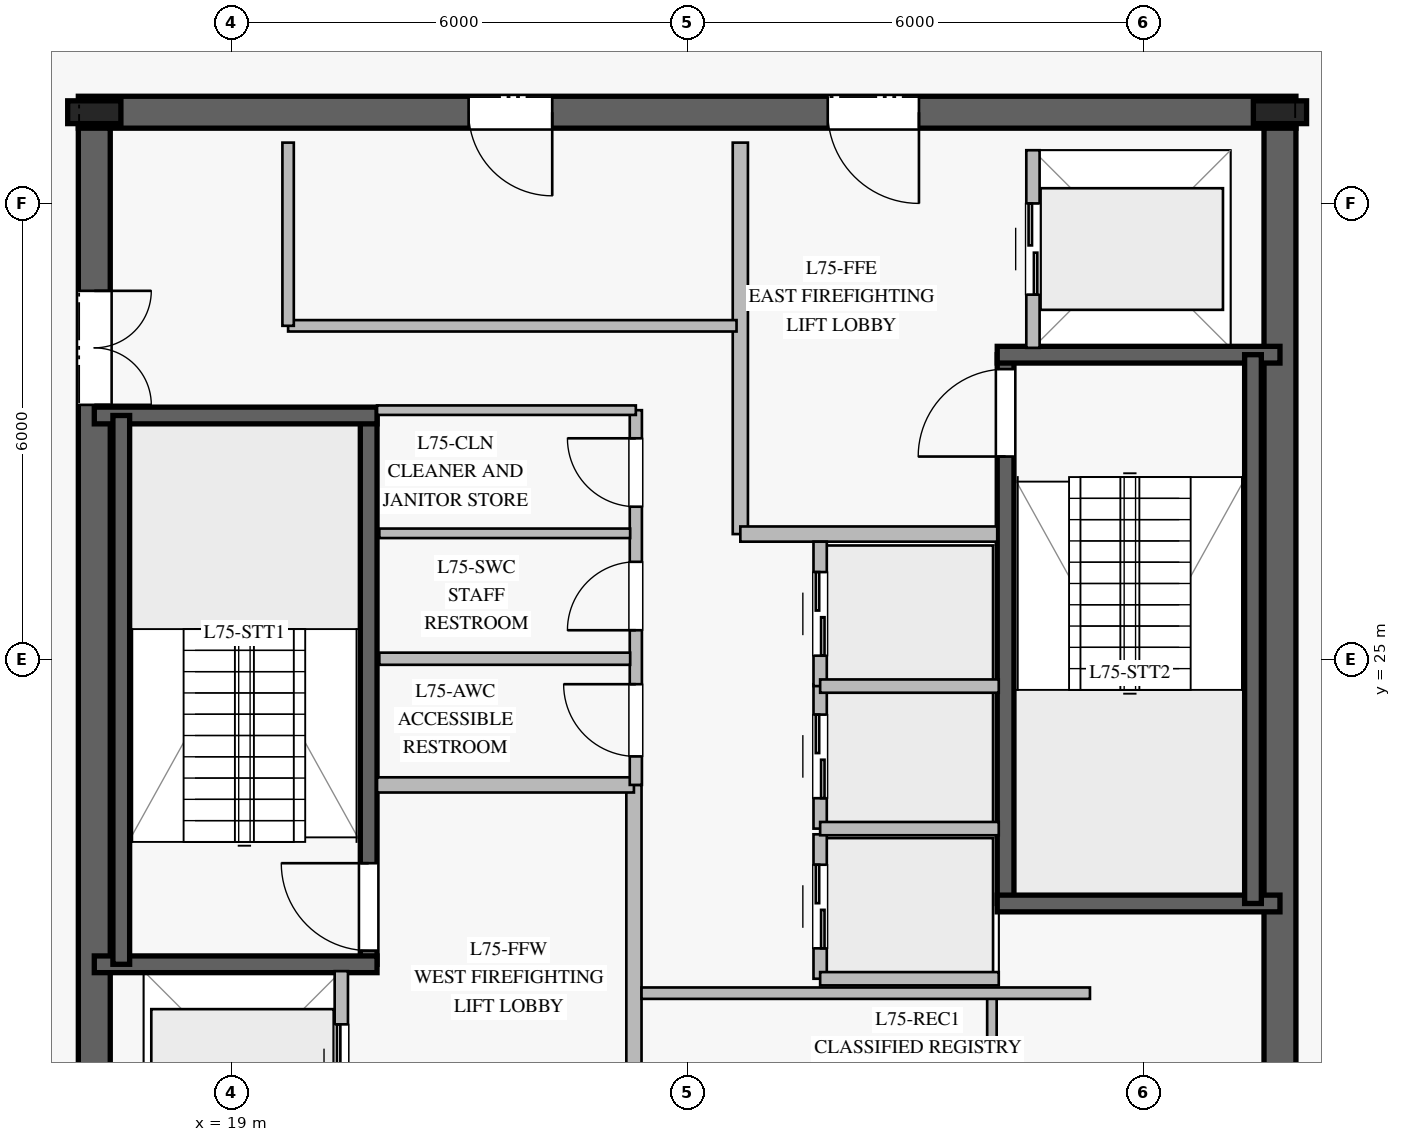
"""IFC4 building model, lengths in metres.
Left out: names, types, materials, properties, quantities, classifications, styles, units other than length and angle.
Written with IfcOpenShell. Run it as: python <this file> out.ifc"""

import sys

from ifc_helpers import new_model, si_unit, direction, frame, frame_2d, origin, origin_2d, place, context, subcontext, project, spatial, rectangle, i_section, extrude, element, fill, save


model = new_model("IFC4")
c1 = context("Model", 3, precision=1e-05, world=origin(), true_north=direction((0.0, 1.0)))
c2 = subcontext(c1, "Body", "Model", "MODEL_VIEW")
j1 = project(units=[si_unit("LENGTHUNIT", "METRE"), si_unit("PLANEANGLEUNIT", "RADIAN")], contexts=[c1])
p1 = place(None, origin())
s1 = spatial("IfcSite", under=j1, at=p1, CompositionType="ELEMENT")
p2 = place(p1, origin())
s2 = spatial("IfcBuilding", under=s1, at=p2, CompositionType="ELEMENT")
p3 = place(p2, frame((0.0, 0.0, 310.2)))
s3 = spatial("IfcBuildingStorey", under=s2, at=p3, CompositionType="ELEMENT", Elevation=310.2)
p4 = place(p3, frame((33.01, 32.2, 0.0), z_axis=(0.0, 0.0, 1.0), x_axis=(-1.0, 0.0, 0.0)))
e1 = element("IfcWall", 1, at=p4, inside=s3, PredefinedType="SHEAR", context=c2, shape_type="SweptSolid", body=[
    extrude(rectangle(XDim=16.02, YDim=0.42, at=frame_2d((8.01, 0.0))), origin(), (0.0, 0.0, 1.0), 3.78),
])
p5 = place(p4, frame((4.96, 0.0, 0.0)))
e2 = element("IfcOpeningElement", 2, at=p5, cuts=e1, PredefinedType="OPENING", context=c2, shape_type="SweptSolid", body=[
    extrude(rectangle(XDim=1.2, YDim=2.25, at=frame_2d((0.6, 1.125))), frame((0.0, 0.22, 0.0), z_axis=(0.0, -1.0, 0.0), x_axis=(1.0, 0.0, 0.0)), (0.0, 0.0, 1.0), 0.44),
])
p6 = place(p4, frame((9.785, 0.0, 0.0)))
e3 = element("IfcOpeningElement", 3, at=p6, cuts=e1, PredefinedType="OPENING", context=c2, shape_type="SweptSolid", body=[
    extrude(rectangle(XDim=1.1, YDim=2.2, at=frame_2d((0.55, 1.1))), frame((0.0, 0.22, 0.0), z_axis=(0.0, -1.0, 0.0), x_axis=(1.0, 0.0, 0.0)), (0.0, 0.0, 1.0), 0.44),
])
p7 = place(p3, frame((17.2, 31.99, 0.0), z_axis=(0.0, 0.0, 1.0), x_axis=(0.0, -1.0, 0.0)))
e4 = element("IfcWall", 4, at=p7, inside=s3, PredefinedType="SHEAR", context=c2, shape_type="SweptSolid", body=[
    extrude(rectangle(XDim=13.98, YDim=0.42, at=frame_2d((6.99, 0.0))), origin(), (0.0, 0.0, 1.0), 3.78),
])
p8 = place(p7, frame((2.14, 0.0, 0.0)))
e5 = element("IfcOpeningElement", 5, at=p8, cuts=e4, PredefinedType="OPENING", context=c2, shape_type="SweptSolid", body=[
    extrude(rectangle(XDim=1.5, YDim=2.2, at=frame_2d((0.75, 1.1))), frame((0.0, 0.22, 0.0), z_axis=(0.0, -1.0, 0.0), x_axis=(1.0, 0.0, 0.0)), (0.0, 0.0, 1.0), 0.44),
])
p9 = place(p3, frame((32.8, 18.01, 0.0), z_axis=(0.0, 0.0, 1.0), x_axis=(0.0, 1.0, 0.0)))
e6 = element("IfcWall", 6, at=p9, inside=s3, PredefinedType="SHEAR", context=c2, shape_type="SweptSolid", body=[
    extrude(rectangle(XDim=13.98, YDim=0.42, at=frame_2d((6.99, 0.0))), origin(), (0.0, 0.0, 1.0), 3.78),
])
for number, where, z_axis, x_axis in (
    (7, (32.8, 32.2, 0.0), (0.0, 0.0, 1.0), (1.0, 0.0, 0.0)),
    (8, (17.2, 32.2, 0.0), (0.0, 0.0, 1.0), (1.0, 0.0, 0.0)),
):
    element("IfcColumn", number, at=place(p3, frame(where, z_axis=z_axis, x_axis=x_axis)), inside=s3, PredefinedType="COLUMN", context=c2, shape_type="SweptSolid", body=[
        extrude(i_section(OverallWidth=0.3, OverallDepth=0.7, WebThickness=0.017, FlangeThickness=0.032, at=origin_2d()), origin(), (0.0, 0.0, 1.0), 4.0),
    ])
p10 = place(p3, frame((20.81, 20.99, 0.0), z_axis=(0.0, 0.0, 1.0), x_axis=(0.0, 1.0, 0.0)))
e9 = element("IfcWall", 9, at=p10, inside=s3, PredefinedType="SOLIDWALL", context=c2, shape_type="SweptSolid", body=[
    extrude(rectangle(XDim=7.22, YDim=0.22, at=frame_2d((3.61, 0.0))), origin(), (0.0, 0.0, 1.0), 3.78),
])
p11 = place(p10, frame((0.18, 0.0, 0.0)))
e10 = element("IfcOpeningElement", 10, at=p11, cuts=e9, PredefinedType="OPENING", context=c2, shape_type="SweptSolid", body=[
    extrude(rectangle(XDim=1.15, YDim=2.2, at=frame_2d((0.575, 1.1))), frame((0.0, 0.12, 0.0), z_axis=(0.0, -1.0, 0.0), x_axis=(1.0, 0.0, 0.0)), (0.0, 0.0, 1.0), 0.24),
])
for number, where, z_axis, x_axis in (
    (11, (17.2, 20.99, 0.0), (0.0, 0.0, 1.0), (1.0, 0.0, 0.0)),
    (12, (17.2, 28.21, 0.0), (0.0, 0.0, 1.0), (1.0, 0.0, 0.0)),
):
    element("IfcWall", number, at=place(p3, frame(where, z_axis=z_axis, x_axis=x_axis)), inside=s3, PredefinedType="SOLIDWALL", context=c2, shape_type="SweptSolid", body=[
        extrude(rectangle(XDim=3.72, YDim=0.22, at=frame_2d((1.86, 0.0))), origin(), (0.0, 0.0, 1.0), 3.78),
    ])
p12 = place(p3, frame((17.555, 28.21, 0.0), z_axis=(0.0, 0.0, 1.0), x_axis=(0.0, -1.0, 0.0)))
e13 = element("IfcWall", 13, at=p12, inside=s3, PredefinedType="SOLIDWALL", context=c2, shape_type="SweptSolid", body=[
    extrude(rectangle(XDim=7.22, YDim=0.22, at=frame_2d((3.61, 0.0))), origin(), (0.0, 0.0, 1.0), 3.78),
])
p13 = place(p3, frame((29.19, 21.79, 0.0), z_axis=(0.0, 0.0, 1.0), x_axis=(0.0, 1.0, 0.0)))
e14 = element("IfcWall", 14, at=p13, inside=s3, PredefinedType="SOLIDWALL", context=c2, shape_type="SweptSolid", body=[
    extrude(rectangle(XDim=7.22, YDim=0.22, at=frame_2d((3.61, 0.0))), origin(), (0.0, 0.0, 1.0), 3.78),
])
p14 = place(p13, frame((5.88, 0.0, 0.0)))
e15 = element("IfcOpeningElement", 15, at=p14, cuts=e14, PredefinedType="OPENING", context=c2, shape_type="SweptSolid", body=[
    extrude(rectangle(XDim=1.15, YDim=2.2, at=frame_2d((0.575, 1.1))), frame((0.0, 0.12, 0.0), z_axis=(0.0, -1.0, 0.0), x_axis=(1.0, 0.0, 0.0)), (0.0, 0.0, 1.0), 0.24),
])
for number, where, z_axis, x_axis in (
    (16, (29.08, 21.79, 0.0), (0.0, 0.0, 1.0), (1.0, 0.0, 0.0)),
    (17, (29.08, 29.01, 0.0), (0.0, 0.0, 1.0), (1.0, 0.0, 0.0)),
):
    element("IfcWall", number, at=place(p3, frame(where, z_axis=z_axis, x_axis=x_axis)), inside=s3, PredefinedType="SOLIDWALL", context=c2, shape_type="SweptSolid", body=[
        extrude(rectangle(XDim=3.72, YDim=0.22, at=frame_2d((1.86, 0.0))), origin(), (0.0, 0.0, 1.0), 3.78),
    ])
p15 = place(p3, frame((32.445, 29.01, 0.0), z_axis=(0.0, 0.0, 1.0), x_axis=(0.0, -1.0, 0.0)))
e18 = element("IfcWall", 18, at=p15, inside=s3, PredefinedType="SOLIDWALL", context=c2, shape_type="SweptSolid", body=[
    extrude(rectangle(XDim=7.22, YDim=0.22, at=frame_2d((3.61, 0.0))), origin(), (0.0, 0.0, 1.0), 3.78),
])
p16 = place(p3, frame((24.3, 18.2, 0.0), z_axis=(0.0, 0.0, 1.0), x_axis=(0.0, 1.0, 0.0)))
e19 = element("IfcWall", 19, at=p16, inside=s3, PredefinedType="PARTITIONING", context=c2, shape_type="SweptSolid", body=[
    extrude(rectangle(XDim=5.15, YDim=0.2, at=frame_2d((2.575, 0.0))), origin(), (0.0, 0.0, 1.0), 3.78),
])
p17 = place(p3, frame((20.92, 23.35, 0.0), z_axis=(0.0, 0.0, 1.0), x_axis=(1.0, 0.0, 0.0)))
e20 = element("IfcWall", 20, at=p17, inside=s3, PredefinedType="PARTITIONING", context=c2, shape_type="SweptSolid", body=[
    extrude(rectangle(XDim=3.38, YDim=0.2, at=frame_2d((1.69, 0.0))), origin(), (0.0, 0.0, 1.0), 3.78),
])
p18 = place(p3, frame((25.7, 26.65, 0.0), z_axis=(0.0, 0.0, 1.0), x_axis=(0.0, 1.0, 0.0)))
e21 = element("IfcWall", 21, at=p18, inside=s3, PredefinedType="PARTITIONING", context=c2, shape_type="SweptSolid", body=[
    extrude(rectangle(XDim=5.15, YDim=0.2, at=frame_2d((2.575, 0.0))), origin(), (0.0, 0.0, 1.0), 3.78),
])
p19 = place(p3, frame((25.7, 26.65, 0.0), z_axis=(0.0, 0.0, 1.0), x_axis=(1.0, 0.0, 0.0)))
e22 = element("IfcWall", 22, at=p19, inside=s3, PredefinedType="PARTITIONING", context=c2, shape_type="SweptSolid", body=[
    extrude(rectangle(XDim=3.38, YDim=0.2, at=frame_2d((1.69, 0.0))), origin(), (0.0, 0.0, 1.0), 3.78),
])
p20 = place(p3, frame((24.325, 23.35, 0.0), z_axis=(0.0, 0.0, 1.0), x_axis=(0.0, 1.0, 0.0)))
e23 = element("IfcWall", 23, at=p20, inside=s3, PredefinedType="PLUMBINGWALL", context=c2, shape_type="SweptSolid", body=[
    extrude(rectangle(XDim=4.93, YDim=0.16, at=frame_2d((2.465, 0.0))), origin(), (0.0, 0.0, 1.0), 3.78),
])
p21 = place(p20, frame((0.375, 0.0, 0.0)))
e24 = element("IfcOpeningElement", 24, at=p21, cuts=e23, PredefinedType="OPENING", context=c2, shape_type="SweptSolid", body=[
    extrude(rectangle(XDim=0.95, YDim=2.1, at=frame_2d((0.475, 1.05))), frame((0.0, 0.09, 0.0), z_axis=(0.0, -1.0, 0.0), x_axis=(1.0, 0.0, 0.0)), (0.0, 0.0, 1.0), 0.18),
])
p22 = place(p20, frame((2.035, 0.0, 0.0)))
e25 = element("IfcOpeningElement", 25, at=p22, cuts=e23, PredefinedType="OPENING", context=c2, shape_type="SweptSolid", body=[
    extrude(rectangle(XDim=0.9, YDim=2.1, at=frame_2d((0.45, 1.05))), frame((0.0, 0.09, 0.0), z_axis=(0.0, -1.0, 0.0), x_axis=(1.0, 0.0, 0.0)), (0.0, 0.0, 1.0), 0.18),
])
p23 = place(p20, frame((3.66, 0.0, 0.0)))
e26 = element("IfcOpeningElement", 26, at=p23, cuts=e23, PredefinedType="OPENING", context=c2, shape_type="SweptSolid", body=[
    extrude(rectangle(XDim=0.9, YDim=2.1, at=frame_2d((0.45, 1.05))), frame((0.0, 0.09, 0.0), z_axis=(0.0, -1.0, 0.0), x_axis=(1.0, 0.0, 0.0)), (0.0, 0.0, 1.0), 0.18),
])
p24 = place(p3, frame((20.92, 28.28, 0.0), z_axis=(0.0, 0.0, 1.0), x_axis=(1.0, 0.0, 0.0)))
e27 = element("IfcWall", 27, at=p24, inside=s3, PredefinedType="PARTITIONING", context=c2, shape_type="SweptSolid", body=[
    extrude(rectangle(XDim=3.405, YDim=0.125, at=frame_2d((1.703, 0.0))), origin(), (0.0, 0.0, 1.0), 3.78),
])
p25 = place(p3, frame((29.01, 18.01, 0.0), z_axis=(0.0, 0.0, 1.0), x_axis=(0.0, 1.0, 0.0)))
e28 = element("IfcWall", 28, at=p25, inside=s3, PredefinedType="PARTITIONING", context=c2, shape_type="SweptSolid", body=[
    extrude(rectangle(XDim=2.54, YDim=0.125, at=frame_2d((1.27, 0.0))), origin(), (0.0, 0.0, 1.0), 3.78),
])
p26 = place(p3, frame((20.95, 25.01, 0.0), z_axis=(0.0, 0.0, 1.0), x_axis=(1.0, 0.0, 0.0)))
e29 = element("IfcWall", 29, at=p26, inside=s3, PredefinedType="PLUMBINGWALL", context=c2, shape_type="SweptSolid", body=[
    extrude(rectangle(XDim=3.3, YDim=0.16, at=frame_2d((1.65, 0.0))), origin(), (0.0, 0.0, 1.0), 3.78),
])
p27 = place(p3, frame((20.95, 26.66, 0.0), z_axis=(0.0, 0.0, 1.0), x_axis=(1.0, 0.0, 0.0)))
e30 = element("IfcWall", 30, at=p27, inside=s3, PredefinedType="PARTITIONING", context=c2, shape_type="SweptSolid", body=[
    extrude(rectangle(XDim=3.3, YDim=0.125, at=frame_2d((1.65, 0.0))), origin(), (0.0, 0.0, 1.0), 3.78),
])
p28 = place(p3, frame((24.4, 20.61, 0.0), z_axis=(0.0, 0.0, 1.0), x_axis=(1.0, 0.0, 0.0)))
e31 = element("IfcWall", 31, at=p28, inside=s3, PredefinedType="PARTITIONING", context=c2, shape_type="SweptSolid", body=[
    extrude(rectangle(XDim=5.9, YDim=0.15, at=frame_2d((2.95, 0.0))), origin(), (0.0, 0.0, 1.0), 3.78),
])
p29 = place(p3, frame((19.75, 29.39, 0.0), z_axis=(0.0, 0.0, 1.0), x_axis=(1.0, 0.0, 0.0)))
e32 = element("IfcWall", 32, at=p29, inside=s3, PredefinedType="PARTITIONING", context=c2, shape_type="SweptSolid", body=[
    extrude(rectangle(XDim=5.9, YDim=0.15, at=frame_2d((2.95, 0.0))), origin(), (0.0, 0.0, 1.0), 3.78),
])
p30 = place(p3, frame((19.75, 29.39, 0.0), z_axis=(0.0, 0.0, 1.0), x_axis=(0.0, 1.0, 0.0)))
e33 = element("IfcWall", 33, at=p30, inside=s3, PredefinedType="PARTITIONING", context=c2, shape_type="SweptSolid", body=[
    extrude(rectangle(XDim=2.41, YDim=0.15, at=frame_2d((1.205, 0.0))), origin(), (0.0, 0.0, 1.0), 3.78),
])
p31 = place(p3, frame((26.75, 20.8, 0.0), z_axis=(0.0, 0.0, 1.0), x_axis=(0.0, 1.0, 0.0)))
e34 = element("IfcWall", 34, at=p31, inside=s3, PredefinedType="PARTITIONING", context=c2, shape_type="SweptSolid", body=[
    extrude(rectangle(XDim=1.9, YDim=0.175, at=frame_2d((0.95, 0.0))), origin(), (0.0, 0.0, 1.0), 3.78),
])
p32 = place(p31, frame((0.4, 0.0, 0.0)))
e35 = element("IfcOpeningElement", 35, at=p32, cuts=e34, PredefinedType="OPENING", context=c2, shape_type="SweptSolid", body=[
    extrude(rectangle(XDim=1.1, YDim=2.2, at=frame_2d((0.55, 1.1))), frame((0.0, 0.098, 0.0), z_axis=(0.0, -1.0, 0.0), x_axis=(1.0, 0.0, 0.0)), (0.0, 0.0, 1.0), 0.195),
])
p33 = place(p3, frame((26.75, 20.8, 0.0), z_axis=(0.0, 0.0, 1.0), x_axis=(1.0, 0.0, 0.0)))
e36 = element("IfcWall", 36, at=p33, inside=s3, PredefinedType="PARTITIONING", context=c2, shape_type="SweptSolid", body=[
    extrude(rectangle(XDim=2.35, YDim=0.175, at=frame_2d((1.175, 0.0))), origin(), (0.0, 0.0, 1.0), 3.78),
])
p34 = place(p3, frame((26.75, 22.775, 0.0), z_axis=(0.0, 0.0, 1.0), x_axis=(0.0, 1.0, 0.0)))
e37 = element("IfcWall", 37, at=p34, inside=s3, PredefinedType="PARTITIONING", context=c2, shape_type="SweptSolid", body=[
    extrude(rectangle(XDim=1.9, YDim=0.175, at=frame_2d((0.95, 0.0))), origin(), (0.0, 0.0, 1.0), 3.78),
])
p35 = place(p34, frame((0.4, 0.0, 0.0)))
e38 = element("IfcOpeningElement", 38, at=p35, cuts=e37, PredefinedType="OPENING", context=c2, shape_type="SweptSolid", body=[
    extrude(rectangle(XDim=1.1, YDim=2.2, at=frame_2d((0.55, 1.1))), frame((0.0, 0.098, 0.0), z_axis=(0.0, -1.0, 0.0), x_axis=(1.0, 0.0, 0.0)), (0.0, 0.0, 1.0), 0.195),
])
p36 = place(p3, frame((26.75, 22.775, 0.0), z_axis=(0.0, 0.0, 1.0), x_axis=(1.0, 0.0, 0.0)))
e39 = element("IfcWall", 39, at=p36, inside=s3, PredefinedType="PARTITIONING", context=c2, shape_type="SweptSolid", body=[
    extrude(rectangle(XDim=2.35, YDim=0.175, at=frame_2d((1.175, 0.0))), origin(), (0.0, 0.0, 1.0), 3.78),
])
p37 = place(p3, frame((26.75, 24.65, 0.0), z_axis=(0.0, 0.0, 1.0), x_axis=(0.0, 1.0, 0.0)))
e40 = element("IfcWall", 40, at=p37, inside=s3, PredefinedType="PARTITIONING", context=c2, shape_type="SweptSolid", body=[
    extrude(rectangle(XDim=1.9, YDim=0.175, at=frame_2d((0.95, 0.0))), origin(), (0.0, 0.0, 1.0), 3.78),
])
p38 = place(p37, frame((0.4, 0.0, 0.0)))
e41 = element("IfcOpeningElement", 41, at=p38, cuts=e40, PredefinedType="OPENING", context=c2, shape_type="SweptSolid", body=[
    extrude(rectangle(XDim=1.1, YDim=2.2, at=frame_2d((0.55, 1.1))), frame((0.0, 0.098, 0.0), z_axis=(0.0, -1.0, 0.0), x_axis=(1.0, 0.0, 0.0)), (0.0, 0.0, 1.0), 0.195),
])
p39 = place(p3, frame((26.75, 24.65, 0.0), z_axis=(0.0, 0.0, 1.0), x_axis=(1.0, 0.0, 0.0)))
e42 = element("IfcWall", 42, at=p39, inside=s3, PredefinedType="PARTITIONING", context=c2, shape_type="SweptSolid", body=[
    extrude(rectangle(XDim=2.35, YDim=0.175, at=frame_2d((1.175, 0.0))), origin(), (0.0, 0.0, 1.0), 3.78),
])
p40 = place(p3, frame((20.45, 18.3, 0.0), z_axis=(0.0, 0.0, 1.0), x_axis=(0.0, 1.0, 0.0)))
e43 = element("IfcWall", 43, at=p40, inside=s3, PredefinedType="PARTITIONING", context=c2, shape_type="SweptSolid", body=[
    extrude(rectangle(XDim=2.6, YDim=0.175, at=frame_2d((1.3, 0.0))), origin(), (0.0, 0.0, 1.0), 3.78),
])
p41 = place(p40, frame((0.7, 0.0, 0.0)))
e44 = element("IfcOpeningElement", 44, at=p41, cuts=e43, PredefinedType="OPENING", context=c2, shape_type="SweptSolid", body=[
    extrude(rectangle(XDim=1.2, YDim=2.2, at=frame_2d((0.6, 1.1))), frame((0.0, 0.098, 0.0), z_axis=(0.0, -1.0, 0.0), x_axis=(1.0, 0.0, 0.0)), (0.0, 0.0, 1.0), 0.195),
])
p42 = place(p3, frame((29.55, 29.1, 0.0), z_axis=(0.0, 0.0, 1.0), x_axis=(0.0, 1.0, 0.0)))
e45 = element("IfcWall", 45, at=p42, inside=s3, PredefinedType="PARTITIONING", context=c2, shape_type="SweptSolid", body=[
    extrude(rectangle(XDim=2.6, YDim=0.175, at=frame_2d((1.3, 0.0))), origin(), (0.0, 0.0, 1.0), 3.78),
])
p43 = place(p42, frame((0.7, 0.0, 0.0)))
e46 = element("IfcOpeningElement", 46, at=p43, cuts=e45, PredefinedType="OPENING", context=c2, shape_type="SweptSolid", body=[
    extrude(rectangle(XDim=1.2, YDim=2.2, at=frame_2d((0.6, 1.1))), frame((0.0, 0.098, 0.0), z_axis=(0.0, -1.0, 0.0), x_axis=(1.0, 0.0, 0.0)), (0.0, 0.0, 1.0), 0.195),
])
p44 = place(p11, origin())
e47 = element("IfcDoor", 47, at=p44, inside=s3, OperationType="SINGLE_SWING_RIGHT", PredefinedType="DOOR", context=c2, shape_type="SweptSolid", body=[
    extrude(rectangle(XDim=1.15, YDim=2.2, at=frame_2d((0.575, 1.1))), frame((0.0, 0.025, 0.0), z_axis=(0.0, -1.0, 0.0), x_axis=(1.0, 0.0, 0.0)), (0.0, 0.0, 1.0), 0.05),
])
fill(e10, e47)
p45 = place(p14, origin())
e48 = element("IfcDoor", 48, at=p45, inside=s3, OperationType="SINGLE_SWING_LEFT", PredefinedType="DOOR", context=c2, shape_type="SweptSolid", body=[
    extrude(rectangle(XDim=1.15, YDim=2.2, at=frame_2d((0.575, 1.1))), frame((0.0, 0.025, 0.0), z_axis=(0.0, -1.0, 0.0), x_axis=(1.0, 0.0, 0.0)), (0.0, 0.0, 1.0), 0.05),
])
fill(e15, e48)
p46 = place(p5, origin())
e49 = element("IfcDoor", 49, at=p46, inside=s3, OperationType="SINGLE_SWING_LEFT", PredefinedType="DOOR", context=c2, shape_type="SweptSolid", body=[
    extrude(rectangle(XDim=1.2, YDim=2.25, at=frame_2d((0.6, 1.125))), frame((0.0, 0.025, 0.0), z_axis=(0.0, -1.0, 0.0), x_axis=(1.0, 0.0, 0.0)), (0.0, 0.0, 1.0), 0.05),
])
fill(e2, e49)
p47 = place(p8, origin())
e50 = element("IfcDoor", 50, at=p47, inside=s3, OperationType="DOUBLE_DOOR_SINGLE_SWING", PredefinedType="DOOR", context=c2, shape_type="SweptSolid", body=[
    extrude(rectangle(XDim=1.5, YDim=2.2, at=frame_2d((0.75, 1.1))), frame((0.0, 0.025, 0.0), z_axis=(0.0, -1.0, 0.0), x_axis=(1.0, 0.0, 0.0)), (0.0, 0.0, 1.0), 0.05),
])
fill(e5, e50)
p48 = place(p21, origin())
e51 = element("IfcDoor", 51, at=p48, inside=s3, OperationType="SINGLE_SWING_RIGHT", PredefinedType="DOOR", context=c2, shape_type="SweptSolid", body=[
    extrude(rectangle(XDim=0.95, YDim=2.1, at=frame_2d((0.475, 1.05))), frame((0.0, 0.025, 0.0), z_axis=(0.0, -1.0, 0.0), x_axis=(1.0, 0.0, 0.0)), (0.0, 0.0, 1.0), 0.05),
])
fill(e24, e51)
p49 = place(p22, origin())
e52 = element("IfcDoor", 52, at=p49, inside=s3, OperationType="SINGLE_SWING_LEFT", PredefinedType="DOOR", context=c2, shape_type="SweptSolid", body=[
    extrude(rectangle(XDim=0.9, YDim=2.1, at=frame_2d((0.45, 1.05))), frame((0.0, 0.025, 0.0), z_axis=(0.0, -1.0, 0.0), x_axis=(1.0, 0.0, 0.0)), (0.0, 0.0, 1.0), 0.05),
])
fill(e25, e52)
p50 = place(p23, origin())
e53 = element("IfcDoor", 53, at=p50, inside=s3, OperationType="SINGLE_SWING_RIGHT", PredefinedType="DOOR", context=c2, shape_type="SweptSolid", body=[
    extrude(rectangle(XDim=0.9, YDim=2.1, at=frame_2d((0.45, 1.05))), frame((0.0, 0.025, 0.0), z_axis=(0.0, -1.0, 0.0), x_axis=(1.0, 0.0, 0.0)), (0.0, 0.0, 1.0), 0.05),
])
fill(e26, e53)
p51 = place(p6, origin())
e54 = element("IfcDoor", 54, at=p51, inside=s3, OperationType="SINGLE_SWING_LEFT", PredefinedType="DOOR", context=c2, shape_type="SweptSolid", body=[
    extrude(rectangle(XDim=1.1, YDim=2.2, at=frame_2d((0.55, 1.1))), frame((0.0, 0.025, 0.0), z_axis=(0.0, -1.0, 0.0), x_axis=(1.0, 0.0, 0.0)), (0.0, 0.0, 1.0), 0.05),
])
fill(e3, e54)
p52 = place(p32, origin())
e55 = element("IfcDoor", 55, at=p52, inside=s3, OperationType="DOUBLE_DOOR_SLIDING", PredefinedType="DOOR", context=c2, shape_type="SweptSolid", body=[
    extrude(rectangle(XDim=1.1, YDim=2.2, at=frame_2d((0.55, 1.1))), frame((0.0, 0.025, 0.0), z_axis=(0.0, -1.0, 0.0), x_axis=(1.0, 0.0, 0.0)), (0.0, 0.0, 1.0), 0.05),
])
fill(e35, e55)
p53 = place(p35, origin())
e56 = element("IfcDoor", 56, at=p53, inside=s3, OperationType="DOUBLE_DOOR_SLIDING", PredefinedType="DOOR", context=c2, shape_type="SweptSolid", body=[
    extrude(rectangle(XDim=1.1, YDim=2.2, at=frame_2d((0.55, 1.1))), frame((0.0, 0.025, 0.0), z_axis=(0.0, -1.0, 0.0), x_axis=(1.0, 0.0, 0.0)), (0.0, 0.0, 1.0), 0.05),
])
fill(e38, e56)
p54 = place(p38, origin())
e57 = element("IfcDoor", 57, at=p54, inside=s3, OperationType="DOUBLE_DOOR_SLIDING", PredefinedType="DOOR", context=c2, shape_type="SweptSolid", body=[
    extrude(rectangle(XDim=1.1, YDim=2.2, at=frame_2d((0.55, 1.1))), frame((0.0, 0.025, 0.0), z_axis=(0.0, -1.0, 0.0), x_axis=(1.0, 0.0, 0.0)), (0.0, 0.0, 1.0), 0.05),
])
fill(e41, e57)
p55 = place(p41, origin())
e58 = element("IfcDoor", 58, at=p55, inside=s3, OperationType="DOUBLE_DOOR_SLIDING", PredefinedType="DOOR", context=c2, shape_type="SweptSolid", body=[
    extrude(rectangle(XDim=1.2, YDim=2.2, at=frame_2d((0.6, 1.1))), frame((0.0, 0.025, 0.0), z_axis=(0.0, -1.0, 0.0), x_axis=(1.0, 0.0, 0.0)), (0.0, 0.0, 1.0), 0.05),
])
fill(e44, e58)
p56 = place(p43, origin())
e59 = element("IfcDoor", 59, at=p56, inside=s3, OperationType="DOUBLE_DOOR_SLIDING", PredefinedType="DOOR", context=c2, shape_type="SweptSolid", body=[
    extrude(rectangle(XDim=1.2, YDim=2.2, at=frame_2d((0.6, 1.1))), frame((0.0, 0.025, 0.0), z_axis=(0.0, -1.0, 0.0), x_axis=(1.0, 0.0, 0.0)), (0.0, 0.0, 1.0), 0.05),
])
fill(e46, e59)
save(model, sys.argv[1])
